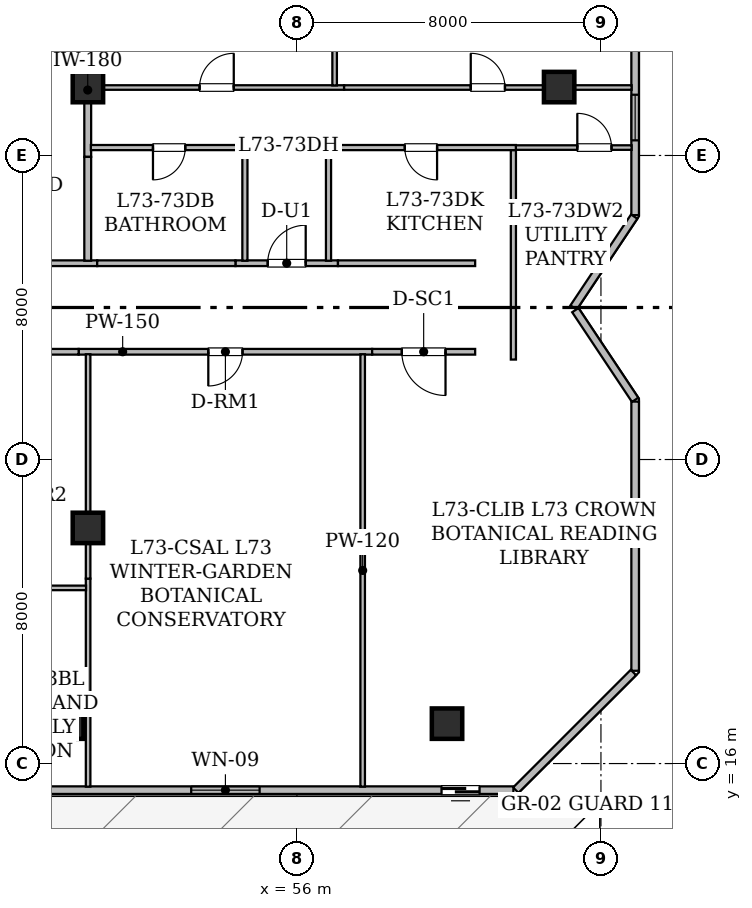
"""IFC4 building model, lengths in metres.
Left out: names, types, materials, properties, quantities, classifications, styles, units other than length and angle.
Written with IfcOpenShell. Run it as: python <this file> out.ifc"""

import sys

from ifc_helpers import new_model, si_unit, direction, frame, frame_2d, origin, origin_2d, place, context, subcontext, project, spatial, rectangle, hollow_rectangle, extrude, element, fill, save


model = new_model("IFC4")
c1 = context("Model", 3, precision=1e-05, world=origin(), true_north=direction((0.0, 1.0)))
c2 = subcontext(c1, "Body", "Model", "MODEL_VIEW")
j1 = project(units=[si_unit("LENGTHUNIT", "METRE"), si_unit("PLANEANGLEUNIT", "RADIAN")], contexts=[c1])
p1 = place(None, origin())
s1 = spatial("IfcSite", under=j1, at=p1, CompositionType="ELEMENT")
p2 = place(p1, origin())
s2 = spatial("IfcBuilding", under=s1, at=p2, CompositionType="ELEMENT")
p3 = place(p2, frame((0.0, 0.0, 286.25)))
s3 = spatial("IfcBuildingStorey", under=s2, at=p3, CompositionType="ELEMENT", Elevation=286.25)
for number, where, z_axis, x_axis in (
    (1, (49.983, 17.05, 0.025), (0.0, 0.0, 1.0), (1.0, 0.0, 0.0)),
    (2, (59.95, 17.05, 0.025), (0.0, 0.0, 1.0), (1.0, 0.0, 0.0)),
    (3, (62.9, 22.2, 0.025), (0.0, 0.0, 1.0), (1.0, 0.0, 0.0)),
    (4, (62.9, 33.8, 0.025), (0.0, 0.0, 1.0), (1.0, 0.0, 0.0)),
):
    element("IfcColumn", number, at=place(p3, frame(where, z_axis=z_axis, x_axis=x_axis)), inside=s3, PredefinedType="COLUMN", context=c2, shape_type="SweptSolid", body=[
        extrude(hollow_rectangle(XDim=0.8, YDim=0.8, WallThickness=0.04, at=origin_2d()), origin(), (0.0, 0.0, 1.0), 4.175),
    ])
for number, where, z_axis, x_axis in (
    (5, (50.5, 22.2, 0.0), (0.0, 0.0, 1.0), (1.0, 0.0, 0.0)),
    (6, (50.5, 33.8, 0.0), (0.0, 0.0, 1.0), (1.0, 0.0, 0.0)),
):
    element("IfcColumn", number, at=place(p3, frame(where, z_axis=z_axis, x_axis=x_axis)), inside=s3, PredefinedType="COLUMN", context=c2, shape_type="SweptSolid", body=[
        extrude(hollow_rectangle(XDim=0.8, YDim=0.8, WallThickness=0.04, at=origin_2d()), origin(), (0.0, 0.0, 1.0), 4.2),
    ])
p4 = place(p3, frame((64.9, 37.497, 0.0), z_axis=(0.0, 0.0, 1.0), x_axis=(0.0, -1.0, 0.0)))
e7 = element("IfcWall", 7, at=p4, inside=s3, PredefinedType="STANDARD", context=c2, shape_type="SweptSolid", body=[
    extrude(rectangle(XDim=7.067, YDim=0.2, at=frame_2d((3.534, 0.0))), origin(), (0.0, 0.0, 1.0), 3.95),
])
p5 = place(p4, frame((3.899, 0.0, 0.78)))
e8 = element("IfcOpeningElement", 8, at=p5, cuts=e7, PredefinedType="OPENING", context=c2, shape_type="SweptSolid", body=[
    extrude(rectangle(XDim=1.2, YDim=1.5, at=frame_2d((0.6, 0.75))), frame((0.0, 0.11, 0.0), z_axis=(0.0, -1.0, 0.0), x_axis=(1.0, 0.0, 0.0)), (0.0, 0.0, 1.0), 0.22),
])
p6 = place(p3, frame((64.875, 30.392, 0.0), z_axis=(0.0, 0.0, 1.0), x_axis=(-0.554758983133, -0.832011100066, 0.0)))
e9 = element("IfcWall", 9, at=p6, inside=s3, PredefinedType="STANDARD", context=c2, shape_type="SweptSolid", body=[
    extrude(rectangle(XDim=2.875, YDim=0.2, at=frame_2d((1.438, 0.0))), origin(), (0.0, 0.0, 1.0), 3.95),
])
p7 = place(p3, frame((63.326, 27.931, 0.0), z_axis=(0.0, 0.0, 1.0), x_axis=(0.554720052174, -0.832037056696, 0.0)))
e10 = element("IfcWall", 10, at=p7, inside=s3, PredefinedType="STANDARD", context=c2, shape_type="SweptSolid", body=[
    extrude(rectangle(XDim=2.837, YDim=0.2, at=frame_2d((1.419, 0.0))), origin(), (0.0, 0.0, 1.0), 3.95),
])
p8 = place(p3, frame((64.9, 25.524, 0.0), z_axis=(0.0, 0.0, 1.0), x_axis=(0.0, -1.0, 0.0)))
e11 = element("IfcWall", 11, at=p8, inside=s3, PredefinedType="STANDARD", context=c2, shape_type="SweptSolid", body=[
    extrude(rectangle(XDim=7.083, YDim=0.2, at=frame_2d((3.542, 0.0))), origin(), (0.0, 0.0, 1.0), 3.95),
])
p9 = place(p3, frame((64.855, 18.396, 0.0), z_axis=(0.0, 0.0, 1.0), x_axis=(-0.707106781187, -0.707106781187, 0.0)))
e12 = element("IfcWall", 12, at=p9, inside=s3, PredefinedType="STANDARD", context=c2, shape_type="SweptSolid", body=[
    extrude(rectangle(XDim=4.378, YDim=0.2, at=frame_2d((2.189, 0.0))), origin(), (0.0, 0.0, 1.0), 3.95),
])
p10 = place(p3, frame((61.696, 15.3, 0.0), z_axis=(0.0, 0.0, 1.0), x_axis=(-1.0, 0.0, 0.0)))
e13 = element("IfcWall", 13, at=p10, inside=s3, PredefinedType="STANDARD", context=c2, shape_type="SweptSolid", body=[
    extrude(rectangle(XDim=33.393, YDim=0.2, at=frame_2d((16.697, 0.0))), origin(), (0.0, 0.0, 1.0), 3.95),
])
p11 = place(p10, frame((0.891, 0.0, 0.0)))
e14 = element("IfcOpeningElement", 14, at=p11, cuts=e13, PredefinedType="OPENING", context=c2, shape_type="SweptSolid", body=[
    extrude(rectangle(XDim=1.0, YDim=2.15, at=frame_2d((0.5, 1.075))), frame((0.0, 0.11, 0.0), z_axis=(0.0, -1.0, 0.0), x_axis=(1.0, 0.0, 0.0)), (0.0, 0.0, 1.0), 0.22),
])
p12 = place(p10, frame((6.678, 0.0, 0.85)))
e15 = element("IfcOpeningElement", 15, at=p12, cuts=e13, PredefinedType="OPENING", context=c2, shape_type="SweptSolid", body=[
    extrude(rectangle(XDim=1.8, YDim=0.92, at=frame_2d((0.9, 0.46))), frame((0.0, 0.11, 0.0), z_axis=(0.0, -1.0, 0.0), x_axis=(1.0, 0.0, 0.0)), (0.0, 0.0, 1.0), 0.22),
])
p13 = place(p10, frame((15.796, 0.0, 0.78)))
e16 = element("IfcOpeningElement", 16, at=p13, cuts=e13, PredefinedType="OPENING", context=c2, shape_type="SweptSolid", body=[
    extrude(rectangle(XDim=1.2, YDim=1.5, at=frame_2d((0.6, 0.75))), frame((0.0, 0.11, 0.0), z_axis=(0.0, -1.0, 0.0), x_axis=(1.0, 0.0, 0.0)), (0.0, 0.0, 1.0), 0.22),
])
p14 = place(p10, frame((12.503, 0.0, 0.85)))
e17 = element("IfcOpeningElement", 17, at=p14, cuts=e13, PredefinedType="OPENING", context=c2, shape_type="SweptSolid", body=[
    extrude(rectangle(XDim=1.8, YDim=0.92, at=frame_2d((0.9, 0.46))), frame((0.0, 0.11, 0.0), z_axis=(0.0, -1.0, 0.0), x_axis=(1.0, 0.0, 0.0)), (0.0, 0.0, 1.0), 0.22),
])
p15 = place(p3, frame((57.979, 26.835, 0.0), z_axis=(0.0, 0.0, 1.0), x_axis=(-1.0, 0.0, 0.0)))
e18 = element("IfcWall", 18, at=p15, inside=s3, PredefinedType="STANDARD", context=c2, shape_type="SweptSolid", body=[
    extrude(rectangle(XDim=7.723, YDim=0.15, at=frame_2d((3.861, 0.0))), origin(), (0.0, 0.0, 1.0), 3.245),
])
p16 = place(p15, frame((3.411, 0.0, 0.0)))
e19 = element("IfcOpeningElement", 19, at=p16, cuts=e18, PredefinedType="OPENING", context=c2, shape_type="SweptSolid", body=[
    extrude(rectangle(XDim=0.9, YDim=2.1, at=frame_2d((0.45, 1.05))), frame((0.0, 0.085, 0.0), z_axis=(0.0, -1.0, 0.0), x_axis=(1.0, 0.0, 0.0)), (0.0, 0.0, 1.0), 0.17),
])
p17 = place(p3, frame((60.69, 26.835, 0.0), z_axis=(0.0, 0.0, 1.0), x_axis=(-1.0, 0.0, 0.0)))
e20 = element("IfcWall", 20, at=p17, inside=s3, PredefinedType="STANDARD", context=c2, shape_type="SweptSolid", body=[
    extrude(rectangle(XDim=2.711, YDim=0.15, at=frame_2d((1.355, 0.0))), origin(), (0.0, 0.0, 1.0), 3.95),
])
p18 = place(p17, frame((0.78, 0.0, 0.0)))
e21 = element("IfcOpeningElement", 21, at=p18, cuts=e20, PredefinedType="OPENING", context=c2, shape_type="SweptSolid", body=[
    extrude(rectangle(XDim=1.15, YDim=2.2, at=frame_2d((0.575, 1.1))), frame((0.0, 0.085, 0.0), z_axis=(0.0, -1.0, 0.0), x_axis=(1.0, 0.0, 0.0)), (0.0, 0.0, 1.0), 0.17),
])
p19 = place(p3, frame((50.256, 26.835, 0.0), z_axis=(0.0, 0.0, 1.0), x_axis=(-1.0, 0.0, 0.0)))
e22 = element("IfcWall", 22, at=p19, inside=s3, PredefinedType="STANDARD", context=c2, shape_type="SweptSolid", body=[
    extrude(rectangle(XDim=3.917, YDim=0.15, at=frame_2d((1.958, 0.0))), origin(), (0.0, 0.0, 1.0), 3.95),
])
p20 = place(p3, frame((45.974, 29.165, 0.0), z_axis=(0.0, 0.0, 1.0), x_axis=(1.0, 0.0, 0.0)))
e23 = element("IfcWall", 23, at=p20, inside=s3, PredefinedType="STANDARD", context=c2, shape_type="SweptSolid", body=[
    extrude(rectangle(XDim=4.77, YDim=0.15, at=frame_2d((2.385, 0.0))), origin(), (0.0, 0.0, 1.0), 3.245),
])
p21 = place(p3, frame((54.382, 29.165, 0.0), z_axis=(0.0, 0.0, 1.0), x_axis=(1.0, 0.0, 0.0)))
e24 = element("IfcWall", 24, at=p21, inside=s3, PredefinedType="STANDARD", context=c2, shape_type="SweptSolid", body=[
    extrude(rectangle(XDim=2.698, YDim=0.15, at=frame_2d((1.349, 0.0))), origin(), (0.0, 0.0, 1.0), 3.95),
])
p22 = place(p21, frame((0.849, 0.0, 0.0)))
e25 = element("IfcOpeningElement", 25, at=p22, cuts=e24, PredefinedType="OPENING", context=c2, shape_type="SweptSolid", body=[
    extrude(rectangle(XDim=1.0, YDim=2.15, at=frame_2d((0.5, 1.075))), frame((0.0, 0.085, 0.0), z_axis=(0.0, -1.0, 0.0), x_axis=(1.0, 0.0, 0.0)), (0.0, 0.0, 1.0), 0.17),
])
p23 = place(p3, frame((50.744, 29.165, 0.0), z_axis=(0.0, 0.0, 1.0), x_axis=(1.0, 0.0, 0.0)))
e26 = element("IfcWall", 26, at=p23, inside=s3, PredefinedType="STANDARD", context=c2, shape_type="SweptSolid", body=[
    extrude(rectangle(XDim=3.638, YDim=0.15, at=frame_2d((1.819, 0.0))), origin(), (0.0, 0.0, 1.0), 3.95),
])
p24 = place(p3, frame((57.08, 29.165, 0.0), z_axis=(0.0, 0.0, 1.0), x_axis=(1.0, 0.0, 0.0)))
e27 = element("IfcWall", 27, at=p24, inside=s3, PredefinedType="STANDARD", context=c2, shape_type="SweptSolid", body=[
    extrude(rectangle(XDim=3.61, YDim=0.15, at=frame_2d((1.805, 0.0))), origin(), (0.0, 0.0, 1.0), 3.95),
])
p25 = place(p3, frame((57.73, 26.77, 0.0), z_axis=(0.0, 0.0, 1.0), x_axis=(0.0, -1.0, 0.0)))
e28 = element("IfcWall", 28, at=p25, inside=s3, PredefinedType="PARTITIONING", context=c2, shape_type="SweptSolid", body=[
    extrude(rectangle(XDim=11.378, YDim=0.12, at=frame_2d((5.689, 0.0))), origin(), (0.0, 0.0, 1.0), 3.245),
])
p26 = place(p3, frame((50.505, 15.392, 0.0), z_axis=(0.0, 0.0, 1.0), x_axis=(0.0, 1.0, 0.0)))
e29 = element("IfcWall", 29, at=p26, inside=s3, PredefinedType="PARTITIONING", context=c2, shape_type="SweptSolid", body=[
    extrude(rectangle(XDim=5.474, YDim=0.12, at=frame_2d((2.737, 0.0))), origin(), (0.0, 0.0, 1.0), 3.245),
])
p27 = place(p3, frame((50.505, 20.866, 0.0), z_axis=(0.0, 0.0, 1.0), x_axis=(0.0, 1.0, 0.0)))
e30 = element("IfcWall", 30, at=p27, inside=s3, PredefinedType="PARTITIONING", context=c2, shape_type="SweptSolid", body=[
    extrude(rectangle(XDim=5.904, YDim=0.12, at=frame_2d((2.952, 0.0))), origin(), (0.0, 0.0, 1.0), 3.245),
])
p28 = place(p3, frame((46.144, 20.622, 0.0), z_axis=(0.0, 0.0, 1.0), x_axis=(1.0, 0.0, 0.0)))
e31 = element("IfcWall", 31, at=p28, inside=s3, PredefinedType="PARTITIONING", context=c2, shape_type="SweptSolid", body=[
    extrude(rectangle(XDim=4.307, YDim=0.12, at=frame_2d((2.153, 0.0))), origin(), (0.0, 0.0, 1.0), 3.245),
])
p29 = place(p3, frame((50.495, 34.032, 0.0), z_axis=(0.0, 0.0, 1.0), x_axis=(0.0, -1.0, 0.0)))
e32 = element("IfcWall", 32, at=p29, inside=s3, PredefinedType="STANDARD", context=c2, shape_type="SweptSolid", body=[
    extrude(rectangle(XDim=2.069, YDim=0.18, at=frame_2d((1.035, 0.0))), origin(), (0.0, 0.0, 1.0), 3.245),
])
p30 = place(p3, frame((50.495, 31.963, 0.0), z_axis=(0.0, 0.0, 1.0), x_axis=(0.0, -1.0, 0.0)))
e33 = element("IfcWall", 33, at=p30, inside=s3, PredefinedType="STANDARD", context=c2, shape_type="SweptSolid", body=[
    extrude(rectangle(XDim=2.733, YDim=0.18, at=frame_2d((1.366, 0.0))), origin(), (0.0, 0.0, 1.0), 3.245),
])
p31 = place(p3, frame((50.495, 36.365, 0.0), z_axis=(0.0, 0.0, 1.0), x_axis=(0.0, -1.0, 0.0)))
e34 = element("IfcWall", 34, at=p31, inside=s3, PredefinedType="STANDARD", context=c2, shape_type="SweptSolid", body=[
    extrude(rectangle(XDim=2.333, YDim=0.18, at=frame_2d((1.167, 0.0))), origin(), (0.0, 0.0, 1.0), 3.245),
])
p32 = place(p3, frame((61.761, 32.208, 0.0), z_axis=(0.0, 0.0, 1.0), x_axis=(1.0, 0.0, 0.0)))
e35 = element("IfcWall", 35, at=p32, inside=s3, PredefinedType="PARTITIONING", context=c2, shape_type="SweptSolid", body=[
    extrude(rectangle(XDim=3.047, YDim=0.12, at=frame_2d((1.523, 0.0))), origin(), (0.0, 0.0, 1.0), 3.407),
])
p33 = place(p32, frame((1.617, 0.0, 0.0)))
e36 = element("IfcOpeningElement", 36, at=p33, cuts=e35, PredefinedType="OPENING", context=c2, shape_type="SweptSolid", body=[
    extrude(rectangle(XDim=0.9, YDim=2.1, at=frame_2d((0.45, 1.05))), frame((0.0, 0.07, 0.0), z_axis=(0.0, -1.0, 0.0), x_axis=(1.0, 0.0, 0.0)), (0.0, 0.0, 1.0), 0.14),
])
p34 = place(p3, frame((61.696, 26.63, 0.0), z_axis=(0.0, 0.0, 1.0), x_axis=(0.0, 1.0, 0.0)))
e37 = element("IfcWall", 37, at=p34, inside=s3, PredefinedType="PARTITIONING", context=c2, shape_type="SweptSolid", body=[
    extrude(rectangle(XDim=5.513, YDim=0.135, at=frame_2d((2.757, 0.0))), origin(), (0.0, 0.0, 1.0), 3.95),
])
p35 = place(p3, frame((54.631, 29.23, 0.0), z_axis=(0.0, 0.0, 1.0), x_axis=(0.0, 1.0, 0.0)))
e38 = element("IfcWall", 38, at=p35, inside=s3, PredefinedType="PARTITIONING", context=c2, shape_type="SweptSolid", body=[
    extrude(rectangle(XDim=3.043, YDim=0.135, at=frame_2d((1.521, 0.0))), origin(), (0.0, 0.0, 1.0), 3.95),
])
p36 = place(p3, frame((54.696, 32.208, 0.0), z_axis=(0.0, 0.0, 1.0), x_axis=(-1.0, 0.0, 0.0)))
e39 = element("IfcWall", 39, at=p36, inside=s3, PredefinedType="PARTITIONING", context=c2, shape_type="SweptSolid", body=[
    extrude(rectangle(XDim=4.119, YDim=0.135, at=frame_2d((2.06, 0.0))), origin(), (0.0, 0.0, 1.0), 3.245),
])
p37 = place(p36, frame((1.634, 0.0, 0.0)))
e40 = element("IfcOpeningElement", 40, at=p37, cuts=e39, PredefinedType="OPENING", context=c2, shape_type="SweptSolid", body=[
    extrude(rectangle(XDim=0.85, YDim=2.1, at=frame_2d((0.425, 1.05))), frame((0.0, 0.077, 0.0), z_axis=(0.0, -1.0, 0.0), x_axis=(1.0, 0.0, 0.0)), (0.0, 0.0, 1.0), 0.155),
])
p38 = place(p3, frame((61.761, 32.208, 0.0), z_axis=(0.0, 0.0, 1.0), x_axis=(-1.0, 0.0, 0.0)))
e41 = element("IfcWall", 41, at=p38, inside=s3, PredefinedType="PARTITIONING", context=c2, shape_type="SweptSolid", body=[
    extrude(rectangle(XDim=4.995, YDim=0.135, at=frame_2d((2.498, 0.0))), origin(), (0.0, 0.0, 1.0), 3.95),
])
p39 = place(p38, frame((2.073, 0.0, 0.0)))
e42 = element("IfcOpeningElement", 42, at=p39, cuts=e41, PredefinedType="OPENING", context=c2, shape_type="SweptSolid", body=[
    extrude(rectangle(XDim=0.85, YDim=2.1, at=frame_2d((0.425, 1.05))), frame((0.0, 0.077, 0.0), z_axis=(0.0, -1.0, 0.0), x_axis=(1.0, 0.0, 0.0)), (0.0, 0.0, 1.0), 0.155),
])
p40 = place(p3, frame((56.831, 32.273, 0.0), z_axis=(0.0, 0.0, 1.0), x_axis=(0.0, -1.0, 0.0)))
e43 = element("IfcWall", 43, at=p40, inside=s3, PredefinedType="PARTITIONING", context=c2, shape_type="SweptSolid", body=[
    extrude(rectangle(XDim=3.043, YDim=0.135, at=frame_2d((1.521, 0.0))), origin(), (0.0, 0.0, 1.0), 3.95),
])
p41 = place(p3, frame((50.577, 33.788, 0.0), z_axis=(0.0, 0.0, 1.0), x_axis=(1.0, 0.0, 0.0)))
e44 = element("IfcWall", 44, at=p41, inside=s3, PredefinedType="PARTITIONING", context=c2, shape_type="SweptSolid", body=[
    extrude(rectangle(XDim=6.664, YDim=0.12, at=frame_2d((3.332, 0.0))), origin(), (0.0, 0.0, 1.0), 3.245),
])
p42 = place(p41, frame((2.861, 0.0, 0.0)))
e45 = element("IfcOpeningElement", 45, at=p42, cuts=e44, PredefinedType="OPENING", context=c2, shape_type="SweptSolid", body=[
    extrude(rectangle(XDim=0.9, YDim=2.1, at=frame_2d((0.45, 1.05))), frame((0.0, 0.07, 0.0), z_axis=(0.0, -1.0, 0.0), x_axis=(1.0, 0.0, 0.0)), (0.0, 0.0, 1.0), 0.14),
])
p43 = place(p3, frame((57.241, 33.788, 0.0), z_axis=(0.0, 0.0, 1.0), x_axis=(1.0, 0.0, 0.0)))
e46 = element("IfcWall", 46, at=p43, inside=s3, PredefinedType="PARTITIONING", context=c2, shape_type="SweptSolid", body=[
    extrude(rectangle(XDim=7.567, YDim=0.12, at=frame_2d((3.784, 0.0))), origin(), (0.0, 0.0, 1.0), 3.245),
])
p44 = place(p43, frame((3.333, 0.0, 0.0)))
e47 = element("IfcOpeningElement", 47, at=p44, cuts=e46, PredefinedType="OPENING", context=c2, shape_type="SweptSolid", body=[
    extrude(rectangle(XDim=0.9, YDim=2.1, at=frame_2d((0.45, 1.05))), frame((0.0, 0.07, 0.0), z_axis=(0.0, -1.0, 0.0), x_axis=(1.0, 0.0, 0.0)), (0.0, 0.0, 1.0), 0.14),
])
p45 = place(p3, frame((56.992, 40.608, 0.0), z_axis=(0.0, 0.0, 1.0), x_axis=(0.0, -1.0, 0.0)))
e48 = element("IfcWall", 48, at=p45, inside=s3, PredefinedType="PARTITIONING", context=c2, shape_type="SweptSolid", body=[
    extrude(rectangle(XDim=6.766, YDim=0.12, at=frame_2d((3.383, 0.0))), origin(), (0.0, 0.0, 1.0), 3.245),
])
p46 = place(p11, origin())
e49 = element("IfcDoor", 49, at=p46, inside=s3, OperationType="SLIDING_TO_LEFT", PredefinedType="DOOR", context=c2, shape_type="SweptSolid", body=[
    extrude(rectangle(XDim=1.0, YDim=2.15, at=frame_2d((0.5, 1.075))), frame((0.0, 0.025, 0.0), z_axis=(0.0, -1.0, 0.0), x_axis=(1.0, 0.0, 0.0)), (0.0, 0.0, 1.0), 0.05),
])
fill(e14, e49)
p47 = place(p12, origin())
e50 = element("IfcWindow", 50, at=p47, inside=s3, PartitioningType="SINGLE_PANEL", PredefinedType="WINDOW", context=c2, shape_type="SweptSolid", body=[
    extrude(rectangle(XDim=1.8, YDim=0.92, at=frame_2d((0.9, 0.46))), frame((0.0, 0.03, 0.0), z_axis=(0.0, -1.0, 0.0), x_axis=(1.0, 0.0, 0.0)), (0.0, 0.0, 1.0), 0.06),
])
fill(e15, e50)
p48 = place(p5, origin())
e51 = element("IfcWindow", 51, at=p48, inside=s3, PartitioningType="SINGLE_PANEL", PredefinedType="WINDOW", context=c2, shape_type="SweptSolid", body=[
    extrude(rectangle(XDim=1.2, YDim=1.5, at=frame_2d((0.6, 0.75))), frame((0.0, 0.03, 0.0), z_axis=(0.0, -1.0, 0.0), x_axis=(1.0, 0.0, 0.0)), (0.0, 0.0, 1.0), 0.06),
])
fill(e8, e51)
p49 = place(p16, origin())
e52 = element("IfcDoor", 52, at=p49, inside=s3, OperationType="SINGLE_SWING_RIGHT", PredefinedType="DOOR", context=c2, shape_type="SweptSolid", body=[
    extrude(rectangle(XDim=0.9, YDim=2.1, at=frame_2d((0.45, 1.05))), frame((0.0, 0.025, 0.0), z_axis=(0.0, -1.0, 0.0), x_axis=(1.0, 0.0, 0.0)), (0.0, 0.0, 1.0), 0.05),
])
fill(e19, e52)
p50 = place(p18, origin())
e53 = element("IfcDoor", 53, at=p50, inside=s3, OperationType="SINGLE_SWING_LEFT", PredefinedType="DOOR", context=c2, shape_type="SweptSolid", body=[
    extrude(rectangle(XDim=1.15, YDim=2.2, at=frame_2d((0.575, 1.1))), frame((0.0, 0.025, 0.0), z_axis=(0.0, -1.0, 0.0), x_axis=(1.0, 0.0, 0.0)), (0.0, 0.0, 1.0), 0.05),
])
fill(e21, e53)
p51 = place(p22, origin())
e54 = element("IfcDoor", 54, at=p51, inside=s3, OperationType="SINGLE_SWING_RIGHT", PredefinedType="DOOR", context=c2, shape_type="SweptSolid", body=[
    extrude(rectangle(XDim=1.0, YDim=2.15, at=frame_2d((0.5, 1.075))), frame((0.0, 0.025, 0.0), z_axis=(0.0, -1.0, 0.0), x_axis=(1.0, 0.0, 0.0)), (0.0, 0.0, 1.0), 0.05),
])
fill(e25, e54)
p52 = place(p33, origin())
e55 = element("IfcDoor", 55, at=p52, inside=s3, OperationType="SINGLE_SWING_LEFT", PredefinedType="DOOR", context=c2, shape_type="SweptSolid", body=[
    extrude(rectangle(XDim=0.9, YDim=2.1, at=frame_2d((0.45, 1.05))), frame((0.0, 0.025, 0.0), z_axis=(0.0, -1.0, 0.0), x_axis=(1.0, 0.0, 0.0)), (0.0, 0.0, 1.0), 0.05),
])
fill(e36, e55)
p53 = place(p37, origin())
e56 = element("IfcDoor", 56, at=p53, inside=s3, OperationType="SINGLE_SWING_RIGHT", PredefinedType="DOOR", context=c2, shape_type="SweptSolid", body=[
    extrude(rectangle(XDim=0.85, YDim=2.1, at=frame_2d((0.425, 1.05))), frame((0.0, 0.025, 0.0), z_axis=(0.0, -1.0, 0.0), x_axis=(1.0, 0.0, 0.0)), (0.0, 0.0, 1.0), 0.05),
])
fill(e40, e56)
p54 = place(p39, origin())
e57 = element("IfcDoor", 57, at=p54, inside=s3, OperationType="SINGLE_SWING_LEFT", PredefinedType="DOOR", context=c2, shape_type="SweptSolid", body=[
    extrude(rectangle(XDim=0.85, YDim=2.1, at=frame_2d((0.425, 1.05))), frame((0.0, 0.025, 0.0), z_axis=(0.0, -1.0, 0.0), x_axis=(1.0, 0.0, 0.0)), (0.0, 0.0, 1.0), 0.05),
])
fill(e42, e57)
p55 = place(p42, origin())
e58 = element("IfcDoor", 58, at=p55, inside=s3, OperationType="SINGLE_SWING_RIGHT", PredefinedType="DOOR", context=c2, shape_type="SweptSolid", body=[
    extrude(rectangle(XDim=0.9, YDim=2.1, at=frame_2d((0.45, 1.05))), frame((0.0, 0.025, 0.0), z_axis=(0.0, -1.0, 0.0), x_axis=(1.0, 0.0, 0.0)), (0.0, 0.0, 1.0), 0.05),
])
fill(e45, e58)
p56 = place(p44, origin())
e59 = element("IfcDoor", 59, at=p56, inside=s3, OperationType="SINGLE_SWING_LEFT", PredefinedType="DOOR", context=c2, shape_type="SweptSolid", body=[
    extrude(rectangle(XDim=0.9, YDim=2.1, at=frame_2d((0.45, 1.05))), frame((0.0, 0.025, 0.0), z_axis=(0.0, -1.0, 0.0), x_axis=(1.0, 0.0, 0.0)), (0.0, 0.0, 1.0), 0.05),
])
fill(e47, e59)
save(model, sys.argv[1])
